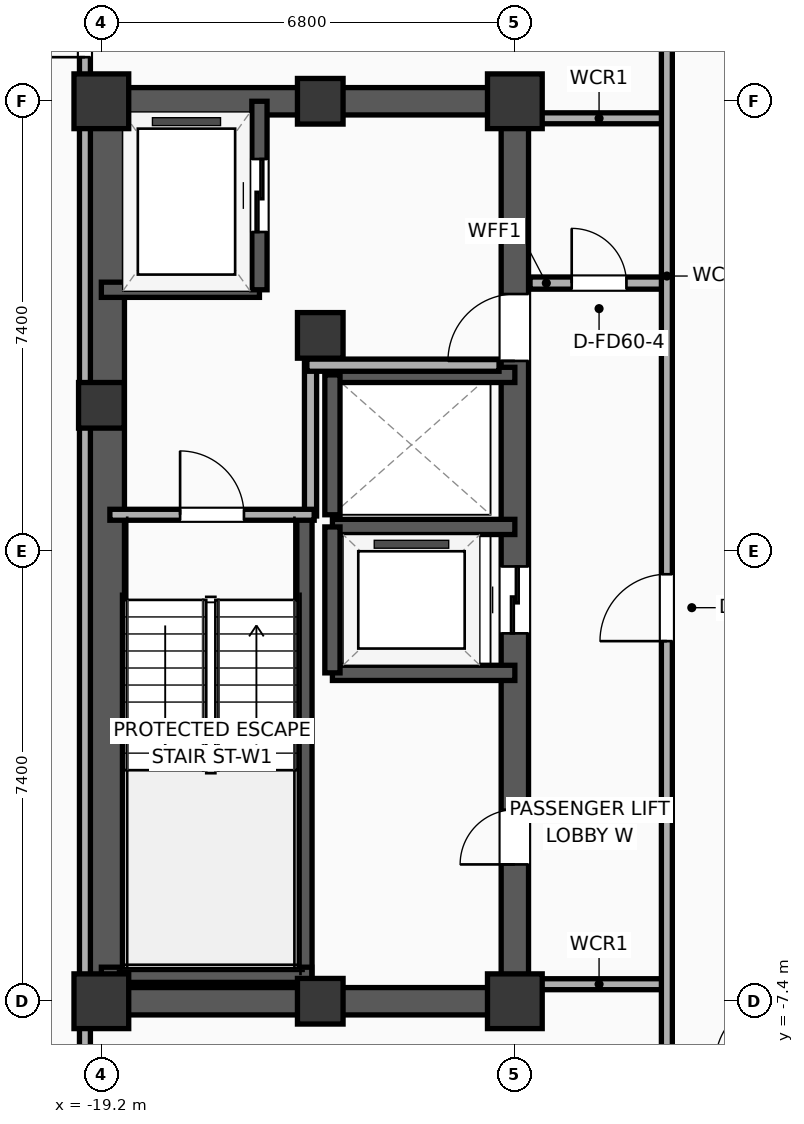
"""IFC4 building model, lengths in metres.
Left out: names, types, materials, properties, quantities, classifications, styles, units other than length and angle.
Written with IfcOpenShell. Run it as: python <this file> out.ifc"""

import sys

from ifc_helpers import new_model, si_unit, direction, frame, frame_2d, origin, origin_2d, place, context, subcontext, project, spatial, rectangle, extrude, element, fill, save


model = new_model("IFC4")
c1 = context("Model", 3, precision=1e-05, world=origin(), true_north=direction((0.0, 1.0)))
c2 = subcontext(c1, "Body", "Model", "MODEL_VIEW")
j1 = project(units=[si_unit("LENGTHUNIT", "METRE"), si_unit("PLANEANGLEUNIT", "RADIAN")], contexts=[c1])
p1 = place(None, origin())
s1 = spatial("IfcSite", under=j1, at=p1, CompositionType="ELEMENT")
p2 = place(p1, origin())
s2 = spatial("IfcBuilding", under=s1, at=p2, CompositionType="ELEMENT")
p3 = place(p2, frame((0.0, 0.0, 148.2)))
s3 = spatial("IfcBuildingStorey", under=s2, at=p3, CompositionType="ELEMENT", Elevation=148.2)
p4 = place(p3, frame((-19.2, -7.4, 0.0), z_axis=(0.0, 0.0, 1.0), x_axis=(1.0, 0.0, 0.0)))
e1 = element("IfcColumn", 1, at=p4, inside=s3, PredefinedType="COLUMN", context=c2, shape_type="SweptSolid", body=[
    extrude(rectangle(XDim=0.9, YDim=0.9, at=origin_2d()), origin(), (0.0, 0.0, 1.0), 3.9),
])
p5 = place(p3, frame((-19.2, 2.4, 0.0), z_axis=(0.0, 0.0, 1.0), x_axis=(1.0, 0.0, 0.0)))
e2 = element("IfcColumn", 2, at=p5, inside=s3, PredefinedType="COLUMN", context=c2, shape_type="SweptSolid", body=[
    extrude(rectangle(XDim=0.75, YDim=0.75, at=origin_2d()), origin(), (0.0, 0.0, 1.0), 3.9),
])
p6 = place(p3, frame((-19.2, 7.4, 0.0), z_axis=(0.0, 0.0, 1.0), x_axis=(1.0, 0.0, 0.0)))
e3 = element("IfcColumn", 3, at=p6, inside=s3, PredefinedType="COLUMN", context=c2, shape_type="SweptSolid", body=[
    extrude(rectangle(XDim=0.9, YDim=0.9, at=origin_2d()), origin(), (0.0, 0.0, 1.0), 3.9),
])
for number, where, z_axis, x_axis in (
    (4, (-15.6, -7.4, 0.0), (0.0, 0.0, 1.0), (1.0, 0.0, 0.0)),
    (5, (-15.6, 7.4, 0.0), (0.0, 0.0, 1.0), (1.0, 0.0, 0.0)),
):
    element("IfcColumn", number, at=place(p3, frame(where, z_axis=z_axis, x_axis=x_axis)), inside=s3, PredefinedType="COLUMN", context=c2, shape_type="SweptSolid", body=[
        extrude(rectangle(XDim=0.75, YDim=0.75, at=origin_2d()), origin(), (0.0, 0.0, 1.0), 3.9),
    ])
p7 = place(p3, frame((-12.4, -7.4, 0.0), z_axis=(0.0, 0.0, 1.0), x_axis=(1.0, 0.0, 0.0)))
e6 = element("IfcColumn", 6, at=p7, inside=s3, PredefinedType="COLUMN", context=c2, shape_type="SweptSolid", body=[
    extrude(rectangle(XDim=0.9, YDim=0.9, at=origin_2d()), origin(), (0.0, 0.0, 1.0), 3.9),
])
p8 = place(p3, frame((-15.6, 3.55, 0.0), z_axis=(0.0, 0.0, 1.0), x_axis=(1.0, 0.0, 0.0)))
e7 = element("IfcColumn", 7, at=p8, inside=s3, PredefinedType="COLUMN", context=c2, shape_type="SweptSolid", body=[
    extrude(rectangle(XDim=0.75, YDim=0.75, at=origin_2d()), origin(), (0.0, 0.0, 1.0), 3.9),
])
p9 = place(p3, frame((-12.4, 7.4, 0.0), z_axis=(0.0, 0.0, 1.0), x_axis=(1.0, 0.0, 0.0)))
e8 = element("IfcColumn", 8, at=p9, inside=s3, PredefinedType="COLUMN", context=c2, shape_type="SweptSolid", body=[
    extrude(rectangle(XDim=0.9, YDim=0.9, at=origin_2d()), origin(), (0.0, 0.0, 1.0), 3.9),
])
for number, where, z_axis, x_axis in (
    (9, (-19.425, -7.4, 0.0), (0.0, 0.0, 1.0), (1.0, 0.0, 0.0)),
    (10, (-19.425, 7.4, 0.0), (0.0, 0.0, 1.0), (1.0, 0.0, 0.0)),
):
    element("IfcWall", number, at=place(p3, frame(where, z_axis=z_axis, x_axis=x_axis)), inside=s3, PredefinedType="SHEAR", context=c2, shape_type="SweptSolid", body=[
        extrude(rectangle(XDim=7.25, YDim=0.45, at=frame_2d((3.625, 0.0))), origin(), (0.0, 0.0, 1.0), 3.65),
    ])
p10 = place(p3, frame((-19.145, -7.4, 0.0), z_axis=(0.0, 0.0, 1.0), x_axis=(0.0, 1.0, 0.0)))
e11 = element("IfcWall", 11, at=p10, inside=s3, PredefinedType="SHEAR", context=c2, shape_type="SweptSolid", body=[
    extrude(rectangle(XDim=14.8, YDim=0.65, at=frame_2d((7.4, 0.0))), origin(), (0.0, 0.0, 1.0), 3.65),
])
p11 = place(p3, frame((-12.4, -7.4, 0.0), z_axis=(0.0, 0.0, 1.0), x_axis=(0.0, 1.0, 0.0)))
e12 = element("IfcWall", 12, at=p11, inside=s3, PredefinedType="SHEAR", context=c2, shape_type="SweptSolid", body=[
    extrude(rectangle(XDim=14.8, YDim=0.45, at=frame_2d((7.4, 0.0))), origin(), (0.0, 0.0, 1.0), 3.65),
])
p12 = place(p11, frame((6.05, 0.0, 0.0)))
e13 = element("IfcOpeningElement", 13, at=p12, cuts=e12, PredefinedType="OPENING", context=c2, shape_type="SweptSolid", body=[
    extrude(rectangle(XDim=1.1, YDim=2.05, at=frame_2d((0.55, 1.025))), frame((0.0, 0.235, 0.0), z_axis=(0.0, -1.0, 0.0), x_axis=(1.0, 0.0, 0.0)), (0.0, 0.0, 1.0), 0.47),
])
p13 = place(p11, frame((10.53, 0.0, 0.0)))
e14 = element("IfcOpeningElement", 14, at=p13, cuts=e12, PredefinedType="OPENING", context=c2, shape_type="SweptSolid", body=[
    extrude(rectangle(XDim=1.1, YDim=2.05, at=frame_2d((0.55, 1.025))), frame((0.0, 0.235, 0.0), z_axis=(0.0, -1.0, 0.0), x_axis=(1.0, 0.0, 0.0)), (0.0, 0.0, 1.0), 0.47),
])
p14 = place(p11, frame((2.25, 0.0, 0.0)))
e15 = element("IfcOpeningElement", 15, at=p14, cuts=e12, PredefinedType="OPENING", context=c2, shape_type="SweptSolid", body=[
    extrude(rectangle(XDim=0.9, YDim=2.05, at=frame_2d((0.45, 1.025))), frame((0.0, 0.235, 0.0), z_axis=(0.0, -1.0, 0.0), x_axis=(1.0, 0.0, 0.0)), (0.0, 0.0, 1.0), 0.47),
])
p15 = place(p3, frame((-15.86, -7.085, 0.0), z_axis=(0.0, 0.0, 1.0), x_axis=(0.0, 1.0, 0.0)))
e16 = element("IfcWall", 16, at=p15, inside=s3, PredefinedType="SOLIDWALL", context=c2, shape_type="SweptSolid", body=[
    extrude(rectangle(XDim=7.685, YDim=0.25, at=frame_2d((3.843, 0.0))), origin(), (0.0, 0.0, 1.0), 3.65),
])
p16 = place(p3, frame((-19.2, -6.965, 0.0), z_axis=(0.0, 0.0, 1.0), x_axis=(1.0, 0.0, 0.0)))
e17 = element("IfcWall", 17, at=p16, inside=s3, PredefinedType="SOLIDWALL", context=c2, shape_type="SweptSolid", body=[
    extrude(rectangle(XDim=3.46, YDim=0.25, at=frame_2d((1.73, 0.0))), origin(), (0.0, 0.0, 1.0), 3.65),
])
p17 = place(p3, frame((-19.2, 4.3, 0.0), z_axis=(0.0, 0.0, 1.0), x_axis=(1.0, 0.0, 0.0)))
e18 = element("IfcWall", 18, at=p17, inside=s3, PredefinedType="SOLIDWALL", context=c2, shape_type="SweptSolid", body=[
    extrude(rectangle(XDim=2.6, YDim=0.25, at=frame_2d((1.3, 0.0))), origin(), (0.0, 0.0, 1.0), 3.65),
])
p18 = place(p3, frame((-16.6, 4.3, 0.0), z_axis=(0.0, 0.0, 1.0), x_axis=(0.0, 1.0, 0.0)))
e19 = element("IfcWall", 19, at=p18, inside=s3, PredefinedType="SOLIDWALL", context=c2, shape_type="SweptSolid", body=[
    extrude(rectangle(XDim=3.1, YDim=0.25, at=frame_2d((1.55, 0.0))), origin(), (0.0, 0.0, 1.0), 3.65),
])
p19 = place(p18, frame((0.95, 0.0, 0.0)))
e20 = element("IfcOpeningElement", 20, at=p19, cuts=e19, PredefinedType="OPENING", context=c2, shape_type="SweptSolid", body=[
    extrude(rectangle(XDim=1.2, YDim=2.05, at=frame_2d((0.6, 1.025))), frame((0.0, 0.135, 0.0), z_axis=(0.0, -1.0, 0.0), x_axis=(1.0, 0.0, 0.0)), (0.0, 0.0, 1.0), 0.27),
])
for number, where, z_axis, x_axis in (
    (21, (-15.4, -2.0, 0.0), (0.0, 0.0, 1.0), (1.0, 0.0, 0.0)),
    (22, (-12.4, 0.4, 0.0), (0.0, 0.0, 1.0), (-1.0, 0.0, 0.0)),
):
    element("IfcWall", number, at=place(p3, frame(where, z_axis=z_axis, x_axis=x_axis)), inside=s3, PredefinedType="SOLIDWALL", context=c2, shape_type="SweptSolid", body=[
        extrude(rectangle(XDim=3.0, YDim=0.25, at=frame_2d((1.5, 0.0))), origin(), (0.0, 0.0, 1.0), 3.65),
    ])
p20 = place(p3, frame((-15.4, 0.4, 0.0), z_axis=(0.0, 0.0, 1.0), x_axis=(0.0, -1.0, 0.0)))
e23 = element("IfcWall", 23, at=p20, inside=s3, PredefinedType="SOLIDWALL", context=c2, shape_type="SweptSolid", body=[
    extrude(rectangle(XDim=2.4, YDim=0.25, at=frame_2d((1.2, 0.0))), origin(), (0.0, 0.0, 1.0), 3.65),
])
p21 = place(p3, frame((-12.4, 2.9, 0.0), z_axis=(0.0, 0.0, 1.0), x_axis=(-1.0, 0.0, 0.0)))
e24 = element("IfcWall", 24, at=p21, inside=s3, PredefinedType="SOLIDWALL", context=c2, shape_type="SweptSolid", body=[
    extrude(rectangle(XDim=3.0, YDim=0.25, at=frame_2d((1.5, 0.0))), origin(), (0.0, 0.0, 1.0), 3.65),
])
p22 = place(p3, frame((-15.4, 2.9, 0.0), z_axis=(0.0, 0.0, 1.0), x_axis=(0.0, -1.0, 0.0)))
e25 = element("IfcWall", 25, at=p22, inside=s3, PredefinedType="SOLIDWALL", context=c2, shape_type="SweptSolid", body=[
    extrude(rectangle(XDim=2.3, YDim=0.25, at=frame_2d((1.15, 0.0))), origin(), (0.0, 0.0, 1.0), 3.65),
])
p23 = place(p3, frame((-15.76, 0.58, 0.0), z_axis=(0.0, 0.0, 1.0), x_axis=(0.0, 1.0, 0.0)))
e26 = element("IfcWall", 26, at=p23, inside=s3, PredefinedType="PARTITIONING", context=c2, shape_type="SweptSolid", body=[
    extrude(rectangle(XDim=2.52, YDim=0.2, at=frame_2d((1.26, 0.0))), origin(), (0.0, 0.0, 1.0), 3.65),
])
p24 = place(p3, frame((-15.82, 3.06, 0.0), z_axis=(0.0, 0.0, 1.0), x_axis=(1.0, 0.0, 0.0)))
e27 = element("IfcWall", 27, at=p24, inside=s3, PredefinedType="PARTITIONING", context=c2, shape_type="SweptSolid", body=[
    extrude(rectangle(XDim=3.16, YDim=0.2, at=frame_2d((1.58, 0.0))), origin(), (0.0, 0.0, 1.0), 3.65),
])
p25 = place(p3, frame((-19.06, 0.6, 0.0), z_axis=(0.0, 0.0, 1.0), x_axis=(1.0, 0.0, 0.0)))
e28 = element("IfcWall", 28, at=p25, inside=s3, PredefinedType="PARTITIONING", context=c2, shape_type="SweptSolid", body=[
    extrude(rectangle(XDim=3.36, YDim=0.18, at=frame_2d((1.68, 0.0))), origin(), (0.0, 0.0, 1.0), 3.65),
])
p26 = place(p25, frame((1.155, 0.0, 0.0)))
e29 = element("IfcOpeningElement", 29, at=p26, cuts=e28, PredefinedType="OPENING", context=c2, shape_type="SweptSolid", body=[
    extrude(rectangle(XDim=1.05, YDim=2.05, at=frame_2d((0.525, 1.025))), frame((0.0, 0.1, 0.0), z_axis=(0.0, -1.0, 0.0), x_axis=(1.0, 0.0, 0.0)), (0.0, 0.0, 1.0), 0.2),
])
p27 = place(p3, frame((-12.15, 4.41, 0.0), z_axis=(0.0, 0.0, 1.0), x_axis=(1.0, 0.0, 0.0)))
e30 = element("IfcWall", 30, at=p27, inside=s3, PredefinedType="PARTITIONING", context=c2, shape_type="SweptSolid", body=[
    extrude(rectangle(XDim=2.27, YDim=0.2, at=frame_2d((1.135, 0.0))), origin(), (0.0, 0.0, 1.0), 3.65),
])
p28 = place(p27, frame((0.685, 0.0, 0.0)))
e31 = element("IfcOpeningElement", 31, at=p28, cuts=e30, PredefinedType="OPENING", context=c2, shape_type="SweptSolid", body=[
    extrude(rectangle(XDim=0.9, YDim=2.05, at=frame_2d((0.45, 1.025))), frame((0.0, 0.11, 0.0), z_axis=(0.0, -1.0, 0.0), x_axis=(1.0, 0.0, 0.0)), (0.0, 0.0, 1.0), 0.22),
])
for number, where, z_axis, x_axis in (
    (32, (-12.15, 7.12, 0.0), (0.0, 0.0, 1.0), (1.0, 0.0, 0.0)),
    (33, (-12.15, -7.12, 0.0), (0.0, 0.0, 1.0), (1.0, 0.0, 0.0)),
):
    element("IfcWall", number, at=place(p3, frame(where, z_axis=z_axis, x_axis=x_axis)), inside=s3, PredefinedType="PARTITIONING", context=c2, shape_type="SweptSolid", body=[
        extrude(rectangle(XDim=2.27, YDim=0.18, at=frame_2d((1.135, 0.0))), origin(), (0.0, 0.0, 1.0), 3.65),
    ])
p29 = place(p3, frame((-9.9, -9.28, 0.0), z_axis=(0.0, 0.0, 1.0), x_axis=(0.0, 1.0, 0.0)))
e34 = element("IfcWall", 34, at=p29, inside=s3, PredefinedType="PARTITIONING", context=c2, shape_type="SweptSolid", body=[
    extrude(rectangle(XDim=18.56, YDim=0.18, at=frame_2d((9.28, 0.0))), origin(), (0.0, 0.0, 1.0), 3.65),
])
p30 = place(p29, frame((7.802, 0.0, 0.0)))
e35 = element("IfcOpeningElement", 35, at=p30, cuts=e34, PredefinedType="OPENING", context=c2, shape_type="SweptSolid", body=[
    extrude(rectangle(XDim=1.1, YDim=2.05, at=frame_2d((0.55, 1.025))), frame((0.0, 0.1, 0.0), z_axis=(0.0, -1.0, 0.0), x_axis=(1.0, 0.0, 0.0)), (0.0, 0.0, 1.0), 0.2),
])
p31 = place(p3, frame((-19.47, -10.75, 0.0), z_axis=(0.0, 0.0, 1.0), x_axis=(0.0, 1.0, 0.0)))
e36 = element("IfcWall", 36, at=p31, inside=s3, PredefinedType="PARTITIONING", context=c2, shape_type="SweptSolid", body=[
    extrude(rectangle(XDim=21.5, YDim=0.18, at=frame_2d((10.75, 0.0))), origin(), (0.0, 0.0, 1.0), 3.04),
])
p32 = place(p31, frame((18.875, 0.0, 0.0)))
e37 = element("IfcOpeningElement", 37, at=p32, cuts=e36, PredefinedType="OPENING", context=c2, shape_type="SweptSolid", body=[
    extrude(rectangle(XDim=0.95, YDim=2.05, at=frame_2d((0.475, 1.025))), frame((0.0, 0.1, 0.0), z_axis=(0.0, -1.0, 0.0), x_axis=(1.0, 0.0, 0.0)), (0.0, 0.0, 1.0), 0.2),
])
p33 = place(p19, origin())
e38 = element("IfcDoor", 38, at=p33, inside=s3, OperationType="SLIDING_TO_LEFT", PredefinedType="DOOR", context=c2, shape_type="SweptSolid", body=[
    extrude(rectangle(XDim=1.2, YDim=2.05, at=frame_2d((0.6, 1.025))), frame((0.0, 0.025, 0.0), z_axis=(0.0, -1.0, 0.0), x_axis=(1.0, 0.0, 0.0)), (0.0, 0.0, 1.0), 0.05),
])
fill(e20, e38)
p34 = place(p12, origin())
e39 = element("IfcDoor", 39, at=p34, inside=s3, OperationType="SLIDING_TO_LEFT", PredefinedType="DOOR", context=c2, shape_type="SweptSolid", body=[
    extrude(rectangle(XDim=1.1, YDim=2.05, at=frame_2d((0.55, 1.025))), frame((0.0, 0.025, 0.0), z_axis=(0.0, -1.0, 0.0), x_axis=(1.0, 0.0, 0.0)), (0.0, 0.0, 1.0), 0.05),
])
fill(e13, e39)
p35 = place(p26, origin())
e40 = element("IfcDoor", 40, at=p35, inside=s3, OperationType="SINGLE_SWING_LEFT", PredefinedType="DOOR", context=c2, shape_type="SweptSolid", body=[
    extrude(rectangle(XDim=1.05, YDim=2.05, at=frame_2d((0.525, 1.025))), frame((0.0, 0.025, 0.0), z_axis=(0.0, -1.0, 0.0), x_axis=(1.0, 0.0, 0.0)), (0.0, 0.0, 1.0), 0.05),
])
fill(e29, e40)
p36 = place(p28, origin())
e41 = element("IfcDoor", 41, at=p36, inside=s3, OperationType="SINGLE_SWING_LEFT", PredefinedType="DOOR", context=c2, shape_type="SweptSolid", body=[
    extrude(rectangle(XDim=0.9, YDim=2.05, at=frame_2d((0.45, 1.025))), frame((0.0, 0.025, 0.0), z_axis=(0.0, -1.0, 0.0), x_axis=(1.0, 0.0, 0.0)), (0.0, 0.0, 1.0), 0.05),
])
fill(e31, e41)
p37 = place(p30, origin())
e42 = element("IfcDoor", 42, at=p37, inside=s3, OperationType="SINGLE_SWING_LEFT", PredefinedType="DOOR", context=c2, shape_type="SweptSolid", body=[
    extrude(rectangle(XDim=1.1, YDim=2.05, at=frame_2d((0.55, 1.025))), frame((0.0, 0.025, 0.0), z_axis=(0.0, -1.0, 0.0), x_axis=(1.0, 0.0, 0.0)), (0.0, 0.0, 1.0), 0.05),
])
fill(e35, e42)
p38 = place(p32, origin())
e43 = element("IfcDoor", 43, at=p38, inside=s3, OperationType="SINGLE_SWING_LEFT", PredefinedType="DOOR", context=c2, shape_type="SweptSolid", body=[
    extrude(rectangle(XDim=0.95, YDim=2.05, at=frame_2d((0.475, 1.025))), frame((0.0, 0.025, 0.0), z_axis=(0.0, -1.0, 0.0), x_axis=(1.0, 0.0, 0.0)), (0.0, 0.0, 1.0), 0.05),
])
fill(e37, e43)
p39 = place(p13, origin())
e44 = element("IfcDoor", 44, at=p39, inside=s3, OperationType="SINGLE_SWING_LEFT", PredefinedType="DOOR", context=c2, shape_type="SweptSolid", body=[
    extrude(rectangle(XDim=1.1, YDim=2.05, at=frame_2d((0.55, 1.025))), frame((0.0, 0.025, 0.0), z_axis=(0.0, -1.0, 0.0), x_axis=(1.0, 0.0, 0.0)), (0.0, 0.0, 1.0), 0.05),
])
fill(e14, e44)
p40 = place(p14, origin())
e45 = element("IfcDoor", 45, at=p40, inside=s3, OperationType="SINGLE_SWING_LEFT", PredefinedType="DOOR", context=c2, shape_type="SweptSolid", body=[
    extrude(rectangle(XDim=0.9, YDim=2.05, at=frame_2d((0.45, 1.025))), frame((0.0, 0.025, 0.0), z_axis=(0.0, -1.0, 0.0), x_axis=(1.0, 0.0, 0.0)), (0.0, 0.0, 1.0), 0.05),
])
fill(e15, e45)
save(model, sys.argv[1])
